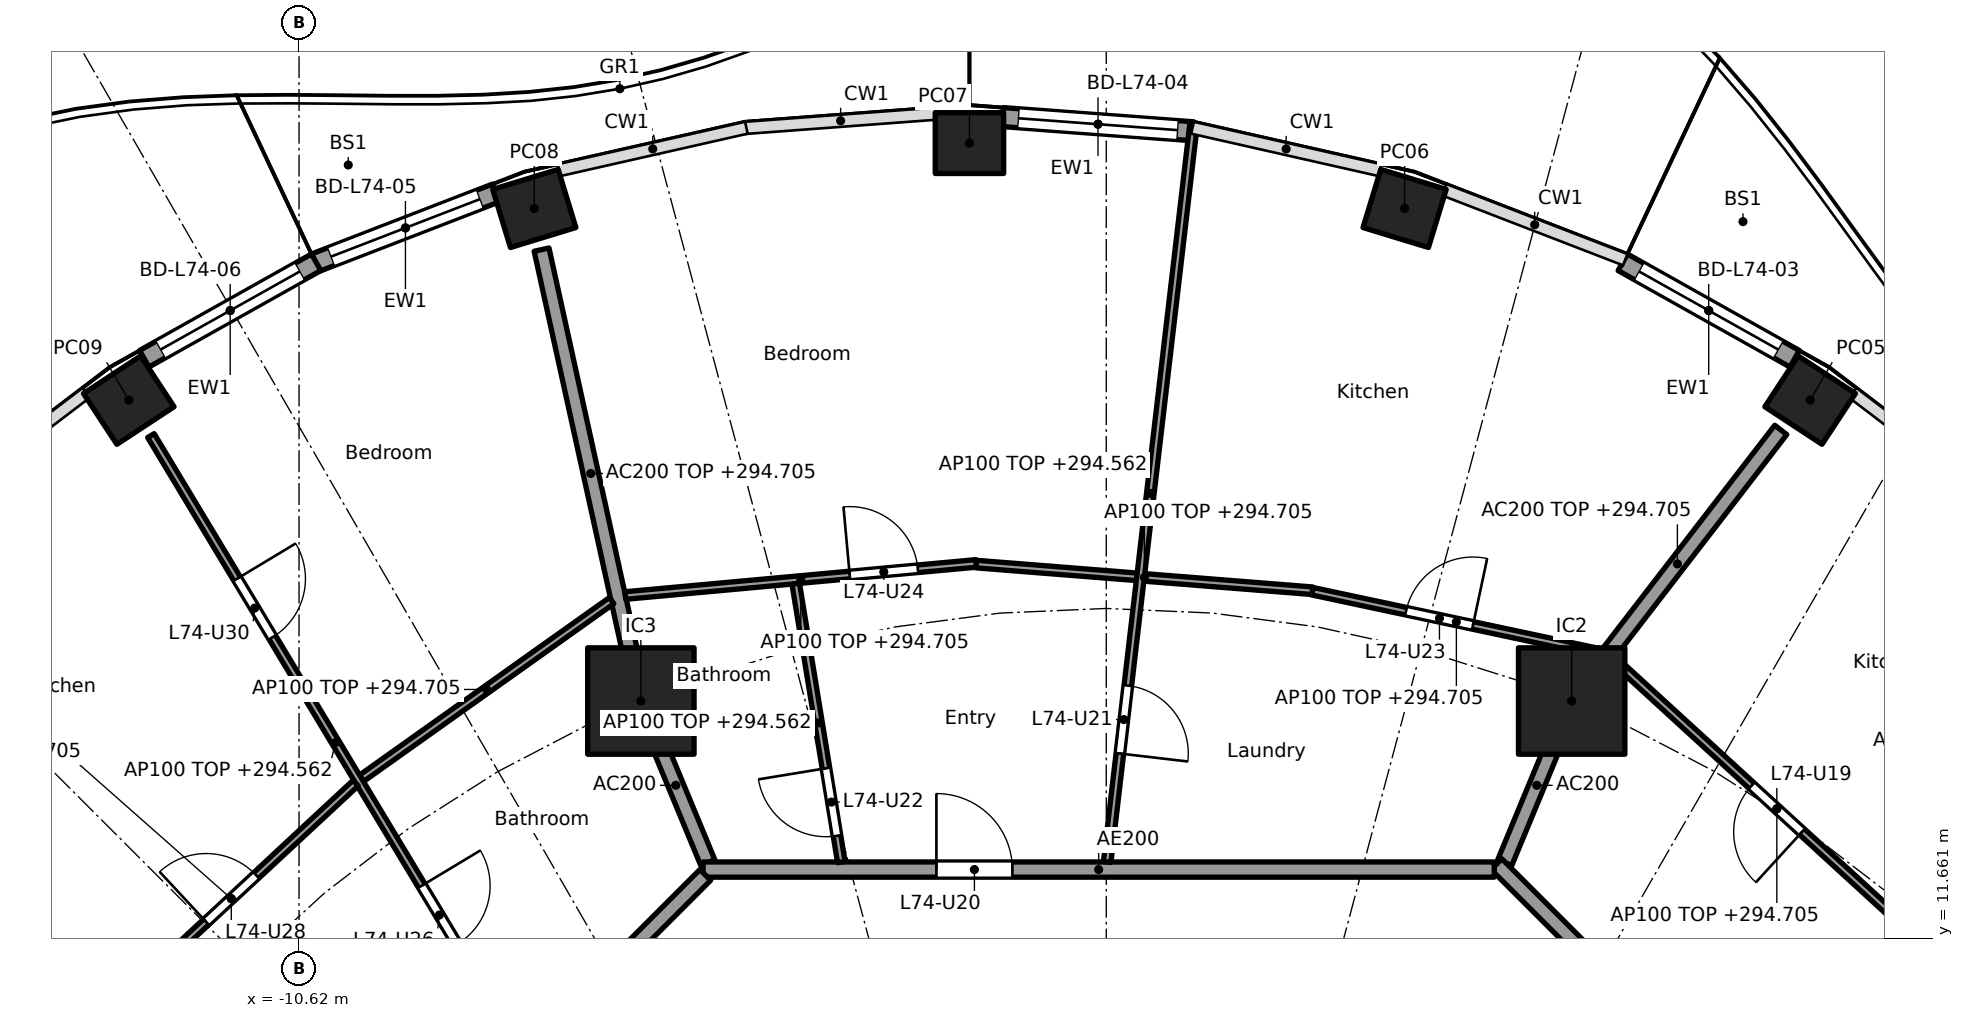
"""IFC4 building model, lengths in metres.
Left out: names, types, materials, properties, quantities, classifications, styles, units other than length and angle.
Written with IfcOpenShell. Run it as: python <this file> out.ifc"""

import sys

from ifc_helpers import new_model, si_unit, direction, frame, frame_2d, origin, origin_2d, place, context, subcontext, project, spatial, rectangle, hollow_rectangle, extrude, element, fill, save


model = new_model("IFC4")
c1 = context("Model", 3, precision=1e-05, world=origin(), true_north=direction((0.0, 1.0)))
c2 = subcontext(c1, "Body", "Model", "MODEL_VIEW")
j1 = project(units=[si_unit("LENGTHUNIT", "METRE"), si_unit("PLANEANGLEUNIT", "RADIAN")], contexts=[c1])
p1 = place(None, origin())
s1 = spatial("IfcSite", under=j1, at=p1, CompositionType="ELEMENT")
p2 = place(p1, origin())
s2 = spatial("IfcBuilding", under=s1, at=p2, CompositionType="ELEMENT")
p3 = place(p2, frame((0.0, 0.0, 291.8)))
s3 = spatial("IfcBuildingStorey", under=s2, at=p3, CompositionType="ELEMENT", Elevation=291.8)
for number, where, z_axis, x_axis in (
    (1, (9.26, 18.741, 0.0), (0.0, 0.0, 1.0), (-0.836, 0.549, 0.0)),
    (2, (3.925, 21.262, 0.0), (0.0, 0.0, 1.0), (-0.957, 0.292, 0.0)),
    (3, (-1.8, 22.122, 0.0), (0.0, 0.0, 1.0), (-1.0, 0.0, 0.0)),
    (4, (-7.525, 21.262, 0.0), (0.0, 0.0, 1.0), (-0.957, -0.292, 0.0)),
    (5, (-12.86, 18.741, 0.0), (0.0, 0.0, 1.0), (-0.836, -0.549, 0.0)),
):
    element("IfcColumn", number, at=place(p3, frame(where, z_axis=z_axis, x_axis=x_axis)), inside=s3, PredefinedType="COLUMN", context=c2, shape_type="SweptSolid", body=[
        extrude(hollow_rectangle(XDim=0.9, YDim=0.8, WallThickness=0.028, at=origin_2d()), origin(), (0.0, 0.0, 1.0), 3.7),
    ])
for number, where, z_axis, x_axis in (
    (6, (6.123, 14.782, 0.0), (0.0, 0.0, 1.0), (1.0, 0.0, 0.0)),
    (7, (-6.123, 14.782, 0.0), (0.0, 0.0, 1.0), (1.0, 0.0, 0.0)),
):
    element("IfcColumn", number, at=place(p3, frame(where, z_axis=z_axis, x_axis=x_axis)), inside=s3, PredefinedType="COLUMN", context=c2, shape_type="SweptSolid", body=[
        extrude(rectangle(XDim=1.4, YDim=1.4, at=origin_2d()), origin(), (0.0, 0.0, 1.0), 3.7),
    ])
p4 = place(p3, frame((6.795, 20.554, 0.0), z_axis=(0.0, 0.0, 1.0), x_axis=(0.872052877201, -0.489411666561, 0.0)))
e8 = element("IfcWall", 8, at=p4, inside=s3, PredefinedType="SOLIDWALL", context=c2, shape_type="SweptSolid", body=[
    extrude(rectangle(XDim=2.593, YDim=0.25, at=frame_2d((1.296, 0.0))), origin(), (0.0, 0.0, 1.0), 3.44),
])
p5 = place(p4, frame((0.247, 0.0, 0.0)))
e9 = element("IfcOpeningElement", 9, at=p5, cuts=e8, PredefinedType="OPENING", context=c2, shape_type="SweptSolid", body=[
    extrude(rectangle(XDim=2.1, YDim=2.4, at=frame_2d((1.05, 1.2))), frame((0.0, 0.135, 0.0), z_axis=(0.0, -1.0, 0.0), x_axis=(1.0, 0.0, 0.0)), (0.0, 0.0, 1.0), 0.27),
])
p6 = place(p3, frame((-1.361, 22.464, 0.0), z_axis=(0.0, 0.0, 1.0), x_axis=(0.997229684519, -0.074383844448, 0.0)))
e10 = element("IfcWall", 10, at=p6, inside=s3, PredefinedType="SOLIDWALL", context=c2, shape_type="SweptSolid", body=[
    extrude(rectangle(XDim=2.511, YDim=0.25, at=frame_2d((1.255, 0.0))), origin(), (0.0, 0.0, 1.0), 3.44),
])
p7 = place(p6, frame((0.205, 0.0, 0.0)))
e11 = element("IfcOpeningElement", 11, at=p7, cuts=e10, PredefinedType="OPENING", context=c2, shape_type="SweptSolid", body=[
    extrude(rectangle(XDim=2.1, YDim=2.4, at=frame_2d((1.05, 1.2))), frame((0.0, 0.135, 0.0), z_axis=(0.0, -1.0, 0.0), x_axis=(1.0, 0.0, 0.0)), (0.0, 0.0, 1.0), 0.27),
])
p8 = place(p3, frame((-10.411, 20.546, 0.0), z_axis=(0.0, 0.0, 1.0), x_axis=(0.93282223778, 0.360336887792, 0.0)))
e12 = element("IfcWall", 12, at=p8, inside=s3, PredefinedType="SOLIDWALL", context=c2, shape_type="SweptSolid", body=[
    extrude(rectangle(XDim=2.554, YDim=0.25, at=frame_2d((1.277, 0.0))), origin(), (0.0, 0.0, 1.0), 3.44),
])
p9 = place(p8, frame((0.227, 0.0, 0.0)))
e13 = element("IfcOpeningElement", 13, at=p9, cuts=e12, PredefinedType="OPENING", context=c2, shape_type="SweptSolid", body=[
    extrude(rectangle(XDim=2.1, YDim=2.4, at=frame_2d((1.05, 1.2))), frame((0.0, 0.135, 0.0), z_axis=(0.0, -1.0, 0.0), x_axis=(1.0, 0.0, 0.0)), (0.0, 0.0, 1.0), 0.27),
])
p10 = place(p3, frame((-12.656, 19.285, 0.0), z_axis=(0.0, 0.0, 1.0), x_axis=(0.872075426507, 0.489371485154, 0.0)))
e14 = element("IfcWall", 14, at=p10, inside=s3, PredefinedType="SOLIDWALL", context=c2, shape_type="SweptSolid", body=[
    extrude(rectangle(XDim=2.593, YDim=0.25, at=frame_2d((1.297, 0.0))), origin(), (0.0, 0.0, 1.0), 3.44),
])
p11 = place(p10, frame((0.247, 0.0, 0.0)))
e15 = element("IfcOpeningElement", 15, at=p11, cuts=e14, PredefinedType="OPENING", context=c2, shape_type="SweptSolid", body=[
    extrude(rectangle(XDim=2.1, YDim=2.4, at=frame_2d((1.05, 1.2))), frame((0.0, 0.135, 0.0), z_axis=(0.0, -1.0, 0.0), x_axis=(1.0, 0.0, 0.0)), (0.0, 0.0, 1.0), 0.27),
])
p12 = place(p3, frame((5.243, 12.657, 0.0), z_axis=(0.0, 0.0, 1.0), x_axis=(0.382691608661, 0.923876145736, 0.0)))
e16 = element("IfcWall", 16, at=p12, inside=s3, PredefinedType="PARTITIONING", context=c2, shape_type="SweptSolid", body=[
    extrude(rectangle(XDim=2.2, YDim=0.2, at=frame_2d((1.1, 0.0))), origin(), (0.0, 0.0, 1.0), 3.44),
])
p13 = place(p3, frame((6.154, 14.822, 0.0), z_axis=(0.0, 0.0, 1.0), x_axis=(0.610687612043, 0.791871606068, 0.0)))
e17 = element("IfcWall", 17, at=p13, inside=s3, PredefinedType="PARTITIONING", context=c2, shape_type="SweptSolid", body=[
    extrude(rectangle(XDim=4.455, YDim=0.2, at=frame_2d((2.228, 0.0))), origin(), (0.0, 0.0, 1.0), 2.905),
])
p14 = place(p3, frame((-5.243, 12.657, 0.0), z_axis=(0.0, 0.0, 1.0), x_axis=(-0.38273085373, 0.923859888513, 0.0)))
e18 = element("IfcWall", 18, at=p14, inside=s3, PredefinedType="PARTITIONING", context=c2, shape_type="SweptSolid", body=[
    extrude(rectangle(XDim=2.199, YDim=0.2, at=frame_2d((1.1, 0.0))), origin(), (0.0, 0.0, 1.0), 3.44),
])
p15 = place(p3, frame((-6.134, 14.831, 0.0), z_axis=(0.0, 0.0, 1.0), x_axis=(-0.214842475666, 0.976648714047, 0.0)))
e19 = element("IfcWall", 19, at=p15, inside=s3, PredefinedType="PARTITIONING", context=c2, shape_type="SweptSolid", body=[
    extrude(rectangle(XDim=6.031, YDim=0.2, at=frame_2d((3.015, 0.0))), origin(), (0.0, 0.0, 1.0), 2.905),
])
p16 = place(p3, frame((12.635, 5.134, 0.0), z_axis=(0.0, 0.0, 1.0), x_axis=(-0.707106781187, 0.707106781187, 0.0)))
e20 = element("IfcWall", 20, at=p16, inside=s3, PredefinedType="PARTITIONING", context=c2, shape_type="SweptSolid", body=[
    extrude(rectangle(XDim=10.609, YDim=0.2, at=frame_2d((5.305, 0.0))), origin(), (0.0, 0.0, 1.0), 3.44),
])
p17 = place(p3, frame((5.104, 12.565, 0.0), z_axis=(0.0, 0.0, 1.0), x_axis=(-1.0, 0.0, 0.0)))
e21 = element("IfcWall", 21, at=p17, inside=s3, PredefinedType="PARTITIONING", context=c2, shape_type="SweptSolid", body=[
    extrude(rectangle(XDim=10.409, YDim=0.2, at=frame_2d((5.205, 0.0))), origin(), (0.0, 0.0, 1.0), 3.44),
])
p18 = place(p17, frame((6.339, 0.0, 0.0)))
e22 = element("IfcOpeningElement", 22, at=p18, cuts=e21, PredefinedType="OPENING", context=c2, shape_type="SweptSolid", body=[
    extrude(rectangle(XDim=1.0, YDim=2.1, at=frame_2d((0.5, 1.05))), frame((0.0, 0.11, 0.0), z_axis=(0.0, -1.0, 0.0), x_axis=(1.0, 0.0, 0.0)), (0.0, 0.0, 1.0), 0.22),
])
p19 = place(p3, frame((-5.275, 12.494, 0.0), z_axis=(0.0, 0.0, 1.0), x_axis=(-0.707106781187, -0.707106781187, 0.0)))
e23 = element("IfcWall", 23, at=p19, inside=s3, PredefinedType="PARTITIONING", context=c2, shape_type="SweptSolid", body=[
    extrude(rectangle(XDim=10.209, YDim=0.2, at=frame_2d((5.104, 0.0))), origin(), (0.0, 0.0, 1.0), 3.44),
])
p20 = place(p19, frame((4.604, 0.0, 0.0)))
e24 = element("IfcOpeningElement", 24, at=p20, cuts=e23, PredefinedType="OPENING", context=c2, shape_type="SweptSolid", body=[
    extrude(rectangle(XDim=1.0, YDim=2.1, at=frame_2d((0.5, 1.05))), frame((0.0, 0.11, 0.0), z_axis=(0.0, -1.0, 0.0), x_axis=(1.0, 0.0, 0.0)), (0.0, 0.0, 1.0), 0.22),
])
p21 = place(p3, frame((10.972, 11.398, 0.0), z_axis=(0.0, 0.0, 1.0), x_axis=(-0.737830272434, 0.674986288069, 0.0)))
e25 = element("IfcWall", 25, at=p21, inside=s3, PredefinedType="PARTITIONING", context=c2, shape_type="SweptSolid", body=[
    extrude(rectangle(XDim=5.827, YDim=0.1, at=frame_2d((2.914, 0.0))), origin(), (0.0, 0.0, 1.0), 2.905),
])
p22 = place(p21, frame((2.464, 0.0, 0.0)))
e26 = element("IfcOpeningElement", 26, at=p22, cuts=e25, PredefinedType="OPENING", context=c2, shape_type="SweptSolid", body=[
    extrude(rectangle(XDim=0.9, YDim=2.1, at=frame_2d((0.45, 1.05))), frame((0.0, 0.06, 0.0), z_axis=(0.0, -1.0, 0.0), x_axis=(1.0, 0.0, 0.0)), (0.0, 0.0, 1.0), 0.12),
])
p23 = place(p3, frame((6.5, 15.419, 0.0), z_axis=(0.0, 0.0, 1.0), x_axis=(-0.978053492557, 0.208353943321, 0.0)))
e27 = element("IfcWall", 27, at=p23, inside=s3, PredefinedType="PARTITIONING", context=c2, shape_type="SweptSolid", body=[
    extrude(rectangle(XDim=3.874, YDim=0.1, at=frame_2d((1.937, 0.0))), origin(), (0.0, 0.0, 1.0), 2.905),
])
p24 = place(p23, frame((1.714, 0.0, 0.0)))
e28 = element("IfcOpeningElement", 28, at=p24, cuts=e27, PredefinedType="OPENING", context=c2, shape_type="SweptSolid", body=[
    extrude(rectangle(XDim=0.9, YDim=2.1, at=frame_2d((0.45, 1.05))), frame((0.0, 0.06, 0.0), z_axis=(0.0, -1.0, 0.0), x_axis=(1.0, 0.0, 0.0)), (0.0, 0.0, 1.0), 0.12),
])
p25 = place(p3, frame((2.713, 16.233, 0.0), z_axis=(0.0, 0.0, 1.0), x_axis=(-0.996870142942, 0.079056423588, 0.0)))
e29 = element("IfcWall", 29, at=p25, inside=s3, PredefinedType="PARTITIONING", context=c2, shape_type="SweptSolid", body=[
    extrude(rectangle(XDim=4.438, YDim=0.1, at=frame_2d((2.219, 0.0))), origin(), (0.0, 0.0, 1.0), 2.905),
])
p26 = place(p3, frame((0.012, 12.664, 0.0), z_axis=(0.0, 0.0, 1.0), x_axis=(0.11636251357, 0.993206808996, 0.0)))
e30 = element("IfcWall", 30, at=p26, inside=s3, PredefinedType="PARTITIONING", context=c2, shape_type="SweptSolid", body=[
    extrude(rectangle(XDim=9.765, YDim=0.1, at=frame_2d((4.882, 0.0))), origin(), (0.0, 0.0, 1.0), 2.762),
])
p27 = place(p26, frame((1.437, 0.0, 0.0)))
e31 = element("IfcOpeningElement", 31, at=p27, cuts=e30, PredefinedType="OPENING", context=c2, shape_type="SweptSolid", body=[
    extrude(rectangle(XDim=0.9, YDim=2.1, at=frame_2d((0.45, 1.05))), frame((0.0, 0.06, 0.0), z_axis=(0.0, -1.0, 0.0), x_axis=(1.0, 0.0, 0.0)), (0.0, 0.0, 1.0), 0.12),
])
p28 = place(p3, frame((-1.711, 16.592, 0.0), z_axis=(0.0, 0.0, 1.0), x_axis=(-0.995843837247, -0.091077175065, 0.0)))
e32 = element("IfcWall", 32, at=p28, inside=s3, PredefinedType="PARTITIONING", context=c2, shape_type="SweptSolid", body=[
    extrude(rectangle(XDim=4.635, YDim=0.1, at=frame_2d((2.317, 0.0))), origin(), (0.0, 0.0, 1.0), 2.905),
])
p29 = place(p28, frame((0.771, 0.0, 0.0)))
e33 = element("IfcOpeningElement", 33, at=p29, cuts=e32, PredefinedType="OPENING", context=c2, shape_type="SweptSolid", body=[
    extrude(rectangle(XDim=0.9, YDim=2.1, at=frame_2d((0.45, 1.05))), frame((0.0, 0.06, 0.0), z_axis=(0.0, -1.0, 0.0), x_axis=(1.0, 0.0, 0.0)), (0.0, 0.0, 1.0), 0.12),
])
p30 = place(p3, frame((-3.486, 12.663, 0.0), z_axis=(0.0, 0.0, 1.0), x_axis=(-0.161602751674, 0.986855891532, 0.0)))
e34 = element("IfcWall", 34, at=p30, inside=s3, PredefinedType="PARTITIONING", context=c2, shape_type="SweptSolid", body=[
    extrude(rectangle(XDim=3.71, YDim=0.1, at=frame_2d((1.855, 0.0))), origin(), (0.0, 0.0, 1.0), 2.762),
])
p31 = place(p30, frame((0.35, 0.0, 0.0)))
e35 = element("IfcOpeningElement", 35, at=p31, cuts=e34, PredefinedType="OPENING", context=c2, shape_type="SweptSolid", body=[
    extrude(rectangle(XDim=0.9, YDim=2.1, at=frame_2d((0.45, 1.05))), frame((0.0, 0.06, 0.0), z_axis=(0.0, -1.0, 0.0), x_axis=(1.0, 0.0, 0.0)), (0.0, 0.0, 1.0), 0.12),
])
p32 = place(p3, frame((-6.508, 16.103, 0.0), z_axis=(0.0, 0.0, 1.0), x_axis=(-0.815202203556, -0.579176456114, 0.0)))
e36 = element("IfcWall", 36, at=p32, inside=s3, PredefinedType="PARTITIONING", context=c2, shape_type="SweptSolid", body=[
    extrude(rectangle(XDim=4.036, YDim=0.1, at=frame_2d((2.018, 0.0))), origin(), (0.0, 0.0, 1.0), 2.905),
])
p33 = place(p3, frame((-7.709, 10.197, 0.0), z_axis=(0.0, 0.0, 1.0), x_axis=(-0.515516160663, 0.856879856278, 0.0)))
e37 = element("IfcWall", 37, at=p33, inside=s3, PredefinedType="PARTITIONING", context=c2, shape_type="SweptSolid", body=[
    extrude(rectangle(XDim=9.426, YDim=0.1, at=frame_2d((4.713, 0.0))), origin(), (0.0, 0.0, 1.0), 2.762),
])
p34 = place(p33, frame((1.615, 0.0, 0.0)))
e38 = element("IfcOpeningElement", 38, at=p34, cuts=e37, PredefinedType="OPENING", context=c2, shape_type="SweptSolid", body=[
    extrude(rectangle(XDim=0.9, YDim=2.1, at=frame_2d((0.45, 1.05))), frame((0.0, 0.06, 0.0), z_axis=(0.0, -1.0, 0.0), x_axis=(1.0, 0.0, 0.0)), (0.0, 0.0, 1.0), 0.12),
])
p35 = place(p33, frame((6.328, 0.0, 0.0)))
e39 = element("IfcOpeningElement", 39, at=p35, cuts=e37, PredefinedType="OPENING", context=c2, shape_type="SweptSolid", body=[
    extrude(rectangle(XDim=0.9, YDim=2.1, at=frame_2d((0.45, 1.05))), frame((0.0, 0.06, 0.0), z_axis=(0.0, -1.0, 0.0), x_axis=(1.0, 0.0, 0.0)), (0.0, 0.0, 1.0), 0.12),
])
p36 = place(p3, frame((-9.875, 13.702, 0.0), z_axis=(0.0, 0.0, 1.0), x_axis=(-0.732618266441, -0.680639754699, 0.0)))
e40 = element("IfcWall", 40, at=p36, inside=s3, PredefinedType="PARTITIONING", context=c2, shape_type="SweptSolid", body=[
    extrude(rectangle(XDim=4.467, YDim=0.1, at=frame_2d((2.233, 0.0))), origin(), (0.0, 0.0, 1.0), 2.905),
])
p37 = place(p36, frame((1.783, 0.0, 0.0)))
e41 = element("IfcOpeningElement", 41, at=p37, cuts=e40, PredefinedType="OPENING", context=c2, shape_type="SweptSolid", body=[
    extrude(rectangle(XDim=0.9, YDim=2.1, at=frame_2d((0.45, 1.05))), frame((0.0, 0.06, 0.0), z_axis=(0.0, -1.0, 0.0), x_axis=(1.0, 0.0, 0.0)), (0.0, 0.0, 1.0), 0.12),
])
p38 = place(p3, frame((-10.183, 7.727, 0.0), z_axis=(0.0, 0.0, 1.0), x_axis=(-0.719063433856, 0.694944442449, 0.0)))
e42 = element("IfcWall", 42, at=p38, inside=s3, PredefinedType="PARTITIONING", context=c2, shape_type="SweptSolid", body=[
    extrude(rectangle(XDim=9.535, YDim=0.1, at=frame_2d((4.768, 0.0))), origin(), (0.0, 0.0, 1.0), 2.762),
])
p39 = place(p38, frame((1.637, 0.0, 0.0)))
e43 = element("IfcOpeningElement", 43, at=p39, cuts=e42, PredefinedType="OPENING", context=c2, shape_type="SweptSolid", body=[
    extrude(rectangle(XDim=0.9, YDim=2.1, at=frame_2d((0.45, 1.05))), frame((0.0, 0.06, 0.0), z_axis=(0.0, -1.0, 0.0), x_axis=(1.0, 0.0, 0.0)), (0.0, 0.0, 1.0), 0.12),
])
p40 = place(p38, frame((6.405, 0.0, 0.0)))
e44 = element("IfcOpeningElement", 44, at=p40, cuts=e42, PredefinedType="OPENING", context=c2, shape_type="SweptSolid", body=[
    extrude(rectangle(XDim=0.9, YDim=2.1, at=frame_2d((0.45, 1.05))), frame((0.0, 0.06, 0.0), z_axis=(0.0, -1.0, 0.0), x_axis=(1.0, 0.0, 0.0)), (0.0, 0.0, 1.0), 0.12),
])
p41 = place(p5, origin())
e45 = element("IfcDoor", 45, at=p41, inside=s3, OperationType="SLIDING_TO_LEFT", PredefinedType="DOOR", context=c2, shape_type="SweptSolid", body=[
    extrude(rectangle(XDim=2.1, YDim=2.4, at=frame_2d((1.05, 1.2))), frame((0.0, 0.025, 0.0), z_axis=(0.0, -1.0, 0.0), x_axis=(1.0, 0.0, 0.0)), (0.0, 0.0, 1.0), 0.05),
])
fill(e9, e45)
p42 = place(p7, origin())
e46 = element("IfcDoor", 46, at=p42, inside=s3, OperationType="SLIDING_TO_LEFT", PredefinedType="DOOR", context=c2, shape_type="SweptSolid", body=[
    extrude(rectangle(XDim=2.1, YDim=2.4, at=frame_2d((1.05, 1.2))), frame((0.0, 0.025, 0.0), z_axis=(0.0, -1.0, 0.0), x_axis=(1.0, 0.0, 0.0)), (0.0, 0.0, 1.0), 0.05),
])
fill(e11, e46)
p43 = place(p9, origin())
e47 = element("IfcDoor", 47, at=p43, inside=s3, OperationType="SLIDING_TO_LEFT", PredefinedType="DOOR", context=c2, shape_type="SweptSolid", body=[
    extrude(rectangle(XDim=2.1, YDim=2.4, at=frame_2d((1.05, 1.2))), frame((0.0, 0.025, 0.0), z_axis=(0.0, -1.0, 0.0), x_axis=(1.0, 0.0, 0.0)), (0.0, 0.0, 1.0), 0.05),
])
fill(e13, e47)
p44 = place(p11, origin())
e48 = element("IfcDoor", 48, at=p44, inside=s3, OperationType="SLIDING_TO_LEFT", PredefinedType="DOOR", context=c2, shape_type="SweptSolid", body=[
    extrude(rectangle(XDim=2.1, YDim=2.4, at=frame_2d((1.05, 1.2))), frame((0.0, 0.025, 0.0), z_axis=(0.0, -1.0, 0.0), x_axis=(1.0, 0.0, 0.0)), (0.0, 0.0, 1.0), 0.05),
])
fill(e15, e48)
p45 = place(p22, origin())
e49 = element("IfcDoor", 49, at=p45, inside=s3, OperationType="SINGLE_SWING_LEFT", PredefinedType="DOOR", context=c2, shape_type="SweptSolid", body=[
    extrude(rectangle(XDim=0.9, YDim=2.1, at=frame_2d((0.45, 1.05))), frame((0.0, 0.025, 0.0), z_axis=(0.0, -1.0, 0.0), x_axis=(1.0, 0.0, 0.0)), (0.0, 0.0, 1.0), 0.05),
])
fill(e26, e49)
p46 = place(p18, frame((1.0, 0.0, 0.0), x_axis=(-1.0, 0.0, 0.0)))
e50 = element("IfcDoor", 50, at=p46, inside=s3, OperationType="SINGLE_SWING_LEFT", PredefinedType="DOOR", context=c2, shape_type="SweptSolid", body=[
    extrude(rectangle(XDim=1.0, YDim=2.1, at=frame_2d((0.5, 1.05))), frame((0.0, 0.025, 0.0), z_axis=(0.0, -1.0, 0.0), x_axis=(1.0, 0.0, 0.0)), (0.0, 0.0, 1.0), 0.05),
])
fill(e22, e50)
p47 = place(p27, frame((0.9, 0.0, 0.0), x_axis=(-1.0, 0.0, 0.0)))
e51 = element("IfcDoor", 51, at=p47, inside=s3, OperationType="SINGLE_SWING_RIGHT", PredefinedType="DOOR", context=c2, shape_type="SweptSolid", body=[
    extrude(rectangle(XDim=0.9, YDim=2.1, at=frame_2d((0.45, 1.05))), frame((0.0, 0.025, 0.0), z_axis=(0.0, -1.0, 0.0), x_axis=(1.0, 0.0, 0.0)), (0.0, 0.0, 1.0), 0.05),
])
fill(e31, e51)
p48 = place(p31, origin())
e52 = element("IfcDoor", 52, at=p48, inside=s3, OperationType="SINGLE_SWING_RIGHT", PredefinedType="DOOR", context=c2, shape_type="SweptSolid", body=[
    extrude(rectangle(XDim=0.9, YDim=2.1, at=frame_2d((0.45, 1.05))), frame((0.0, 0.025, 0.0), z_axis=(0.0, -1.0, 0.0), x_axis=(1.0, 0.0, 0.0)), (0.0, 0.0, 1.0), 0.05),
])
fill(e35, e52)
p49 = place(p24, frame((0.9, 0.0, 0.0), x_axis=(-1.0, 0.0, 0.0)))
e53 = element("IfcDoor", 53, at=p49, inside=s3, OperationType="SINGLE_SWING_RIGHT", PredefinedType="DOOR", context=c2, shape_type="SweptSolid", body=[
    extrude(rectangle(XDim=0.9, YDim=2.1, at=frame_2d((0.45, 1.05))), frame((0.0, 0.025, 0.0), z_axis=(0.0, -1.0, 0.0), x_axis=(1.0, 0.0, 0.0)), (0.0, 0.0, 1.0), 0.05),
])
fill(e28, e53)
p50 = place(p29, frame((0.9, 0.0, 0.0), x_axis=(-1.0, 0.0, 0.0)))
e54 = element("IfcDoor", 54, at=p50, inside=s3, OperationType="SINGLE_SWING_LEFT", PredefinedType="DOOR", context=c2, shape_type="SweptSolid", body=[
    extrude(rectangle(XDim=0.9, YDim=2.1, at=frame_2d((0.45, 1.05))), frame((0.0, 0.025, 0.0), z_axis=(0.0, -1.0, 0.0), x_axis=(1.0, 0.0, 0.0)), (0.0, 0.0, 1.0), 0.05),
])
fill(e33, e54)
p51 = place(p34, frame((0.9, 0.0, 0.0), x_axis=(-1.0, 0.0, 0.0)))
e55 = element("IfcDoor", 55, at=p51, inside=s3, OperationType="SINGLE_SWING_LEFT", PredefinedType="DOOR", context=c2, shape_type="SweptSolid", body=[
    extrude(rectangle(XDim=0.9, YDim=2.1, at=frame_2d((0.45, 1.05))), frame((0.0, 0.025, 0.0), z_axis=(0.0, -1.0, 0.0), x_axis=(1.0, 0.0, 0.0)), (0.0, 0.0, 1.0), 0.05),
])
fill(e38, e55)
p52 = place(p37, frame((0.9, 0.0, 0.0), x_axis=(-1.0, 0.0, 0.0)))
e56 = element("IfcDoor", 56, at=p52, inside=s3, OperationType="SINGLE_SWING_LEFT", PredefinedType="DOOR", context=c2, shape_type="SweptSolid", body=[
    extrude(rectangle(XDim=0.9, YDim=2.1, at=frame_2d((0.45, 1.05))), frame((0.0, 0.025, 0.0), z_axis=(0.0, -1.0, 0.0), x_axis=(1.0, 0.0, 0.0)), (0.0, 0.0, 1.0), 0.05),
])
fill(e41, e56)
p53 = place(p35, frame((0.9, 0.0, 0.0), x_axis=(-1.0, 0.0, 0.0)))
e57 = element("IfcDoor", 57, at=p53, inside=s3, OperationType="SINGLE_SWING_LEFT", PredefinedType="DOOR", context=c2, shape_type="SweptSolid", body=[
    extrude(rectangle(XDim=0.9, YDim=2.1, at=frame_2d((0.45, 1.05))), frame((0.0, 0.025, 0.0), z_axis=(0.0, -1.0, 0.0), x_axis=(1.0, 0.0, 0.0)), (0.0, 0.0, 1.0), 0.05),
])
fill(e39, e57)
save(model, sys.argv[1])
